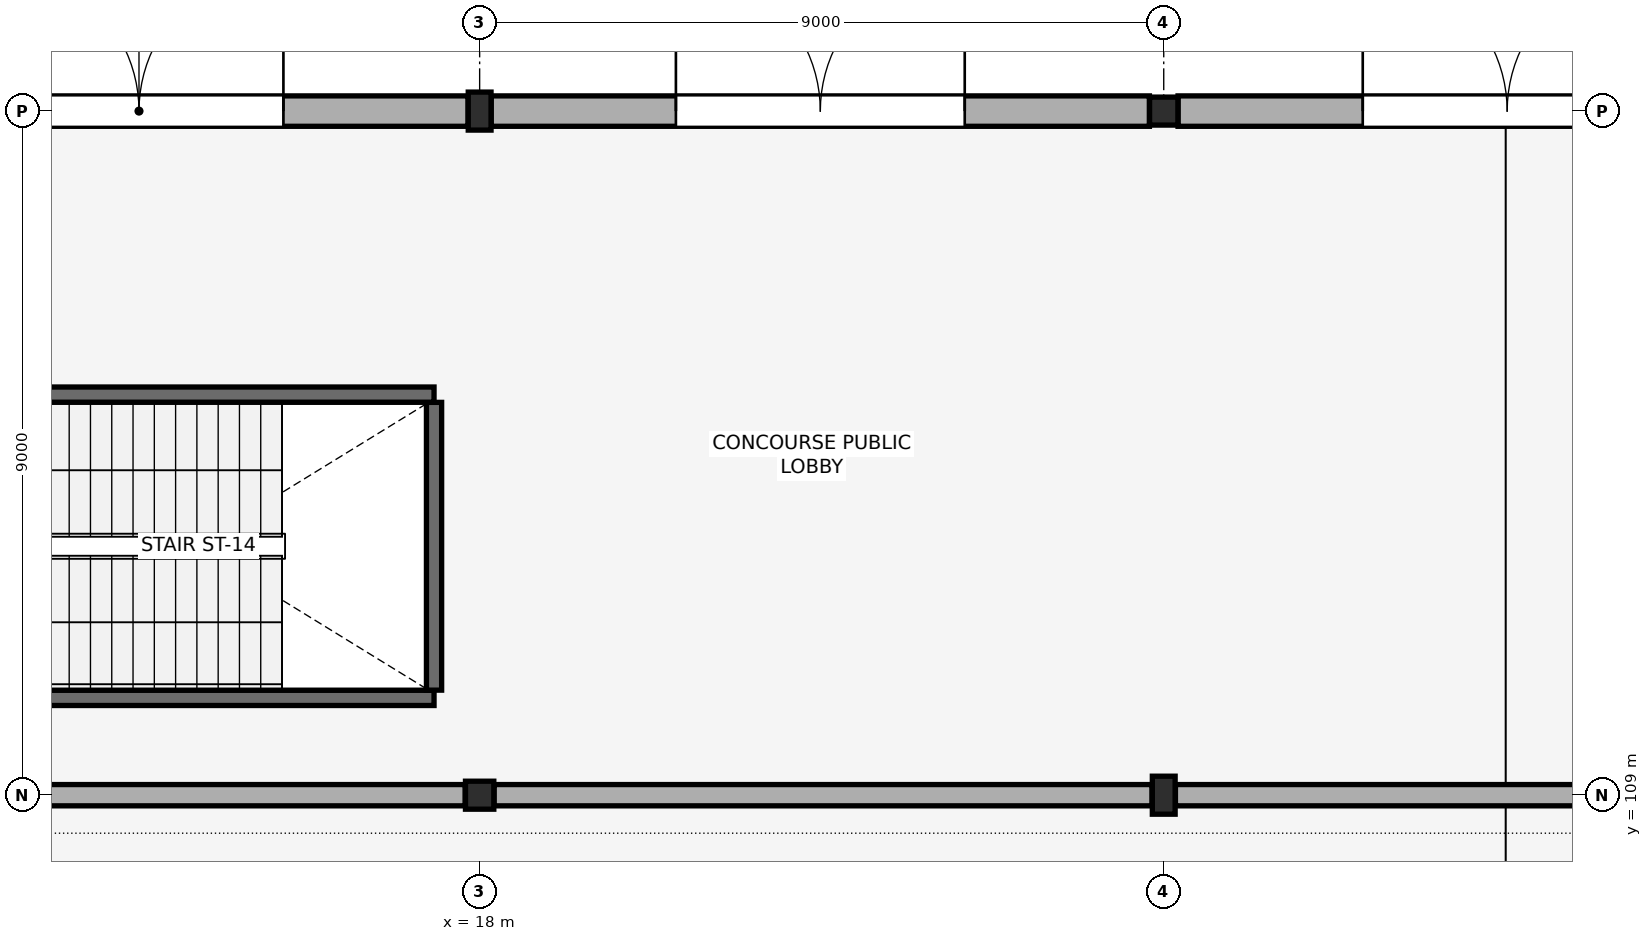
"""IFC4 building model, lengths in metres.
Left out: names, types, materials, properties, quantities, classifications, styles, units other than length and angle.
Written with IfcOpenShell. Run it as: python <this file> out.ifc"""

import sys

from ifc_helpers import new_model, si_unit, direction, frame, frame_2d, origin, origin_2d, place, context, subcontext, project, spatial, rectangle, i_section, extrude, element, fill, save


model = new_model("IFC4")
c1 = context("Model", 3, precision=1e-05, world=origin(), true_north=direction((0.0, 1.0)))
c2 = subcontext(c1, "Body", "Model", "MODEL_VIEW")
j1 = project(units=[si_unit("LENGTHUNIT", "METRE"), si_unit("PLANEANGLEUNIT", "RADIAN")], contexts=[c1])
p1 = place(None, origin())
s1 = spatial("IfcSite", under=j1, at=p1, CompositionType="ELEMENT")
p2 = place(p1, origin())
s2 = spatial("IfcBuilding", under=s1, at=p2, CompositionType="ELEMENT")
p3 = place(p2, origin())
s3 = spatial("IfcBuildingStorey", under=s2, at=p3, CompositionType="ELEMENT", Elevation=0.0)
p4 = place(p3, frame((18.0, 109.0, 0.0), z_axis=(0.0, 0.0, 1.0), x_axis=(1.0, 0.0, 0.0)))
e1 = element("IfcColumn", 1, at=p4, inside=s3, PredefinedType="COLUMN", context=c2, shape_type="SweptSolid", body=[
    extrude(i_section(OverallWidth=0.373, OverallDepth=0.368, WebThickness=0.014, FlangeThickness=0.024, FilletRadius=0.015, at=origin_2d()), origin(), (0.0, 0.0, 1.0), 5.4),
])
for number, where, z_axis, x_axis in (
    (2, (18.0, 118.0, 0.0), (0.0, 0.0, 1.0), (1.0, 0.0, 0.0)),
    (3, (27.0, 109.0, 0.0), (0.0, 0.0, 1.0), (1.0, 0.0, 0.0)),
):
    element("IfcColumn", number, at=place(p3, frame(where, z_axis=z_axis, x_axis=x_axis)), inside=s3, PredefinedType="COLUMN", context=c2, shape_type="SweptSolid", body=[
        extrude(i_section(OverallWidth=0.3, OverallDepth=0.5, WebThickness=0.014, FlangeThickness=0.028, FilletRadius=0.027, at=origin_2d()), origin(), (0.0, 0.0, 1.0), 5.4),
    ])
p5 = place(p3, frame((27.0, 118.0, 0.0), z_axis=(0.0, 0.0, 1.0), x_axis=(1.0, 0.0, 0.0)))
e4 = element("IfcColumn", 4, at=p5, inside=s3, PredefinedType="COLUMN", context=c2, shape_type="SweptSolid", body=[
    extrude(i_section(OverallWidth=0.373, OverallDepth=0.368, WebThickness=0.014, FlangeThickness=0.024, FilletRadius=0.015, at=origin_2d()), origin(), (0.0, 0.0, 1.0), 5.4),
])
p6 = place(p3, frame((9.188, 118.0, 0.0), z_axis=(0.0, 0.0, 1.0), x_axis=(1.0, 0.0, 0.0)))
e5 = element("IfcWall", 5, at=p6, inside=s3, PredefinedType="STANDARD", context=c2, shape_type="SweptSolid", body=[
    extrude(rectangle(XDim=8.66, YDim=0.4, at=frame_2d((4.33, 0.0))), origin(), (0.0, 0.0, 1.0), 4.507),
])
p7 = place(p6, frame((2.43, 0.0, 0.0)))
e6 = element("IfcOpeningElement", 6, at=p7, cuts=e5, PredefinedType="OPENING", context=c2, shape_type="SweptSolid", body=[
    extrude(rectangle(XDim=3.8, YDim=2.8, at=frame_2d((1.9, 1.4))), frame((0.0, 0.21, 0.0), z_axis=(0.0, -1.0, 0.0), x_axis=(1.0, 0.0, 0.0)), (0.0, 0.0, 1.0), 0.42),
])
p8 = place(p3, frame((18.152, 118.0, 0.0), z_axis=(0.0, 0.0, 1.0), x_axis=(1.0, 0.0, 0.0)))
e7 = element("IfcWall", 7, at=p8, inside=s3, PredefinedType="STANDARD", context=c2, shape_type="SweptSolid", body=[
    extrude(rectangle(XDim=8.66, YDim=0.4, at=frame_2d((4.33, 0.0))), origin(), (0.0, 0.0, 1.0), 4.507),
])
p9 = place(p8, frame((2.43, 0.0, 0.0)))
e8 = element("IfcOpeningElement", 8, at=p9, cuts=e7, PredefinedType="OPENING", context=c2, shape_type="SweptSolid", body=[
    extrude(rectangle(XDim=3.8, YDim=2.8, at=frame_2d((1.9, 1.4))), frame((0.0, 0.21, 0.0), z_axis=(0.0, -1.0, 0.0), x_axis=(1.0, 0.0, 0.0)), (0.0, 0.0, 1.0), 0.42),
])
p10 = place(p3, frame((27.188, 118.0, 0.0), z_axis=(0.0, 0.0, 1.0), x_axis=(1.0, 0.0, 0.0)))
e9 = element("IfcWall", 9, at=p10, inside=s3, PredefinedType="STANDARD", context=c2, shape_type="SweptSolid", body=[
    extrude(rectangle(XDim=8.66, YDim=0.4, at=frame_2d((4.33, 0.0))), origin(), (0.0, 0.0, 1.0), 4.507),
])
p11 = place(p10, frame((2.43, 0.0, 0.0)))
e10 = element("IfcOpeningElement", 10, at=p11, cuts=e9, PredefinedType="OPENING", context=c2, shape_type="SweptSolid", body=[
    extrude(rectangle(XDim=3.8, YDim=2.8, at=frame_2d((1.9, 1.4))), frame((0.0, 0.21, 0.0), z_axis=(0.0, -1.0, 0.0), x_axis=(1.0, 0.0, 0.0)), (0.0, 0.0, 1.0), 0.42),
])
p12 = place(p3, frame((9.45, 110.28, 0.0), z_axis=(0.0, 0.0, 1.0), x_axis=(1.0, 0.0, 0.0)))
e11 = element("IfcWall", 11, at=p12, inside=s3, PredefinedType="SHEAR", context=c2, shape_type="SweptSolid", body=[
    extrude(rectangle(XDim=7.95, YDim=0.2, at=frame_2d((3.975, 0.0))), origin(), (0.0, 0.0, 1.0), 5.4),
])
p13 = place(p3, frame((17.4, 110.382, 0.0), z_axis=(0.0, 0.0, 1.0), x_axis=(0.0, 1.0, 0.0)))
e12 = element("IfcWall", 12, at=p13, inside=s3, PredefinedType="SHEAR", context=c2, shape_type="SweptSolid", body=[
    extrude(rectangle(XDim=3.786, YDim=0.2, at=frame_2d((1.893, 0.0))), origin(), (0.0, 0.0, 1.0), 5.4),
])
p14 = place(p3, frame((9.45, 114.27, 0.0), z_axis=(0.0, 0.0, 1.0), x_axis=(1.0, 0.0, 0.0)))
e13 = element("IfcWall", 13, at=p14, inside=s3, PredefinedType="SHEAR", context=c2, shape_type="SweptSolid", body=[
    extrude(rectangle(XDim=7.95, YDim=0.2, at=frame_2d((3.975, 0.0))), origin(), (0.0, 0.0, 1.0), 5.4),
])
for number, where, z_axis, x_axis in (
    (14, (9.154, 109.0, 0.0), (0.0, 0.0, 1.0), (1.0, 0.0, 0.0)),
    (15, (18.19, 109.0, 0.0), (0.0, 0.0, 1.0), (1.0, 0.0, 0.0)),
):
    element("IfcWall", number, at=place(p3, frame(where, z_axis=z_axis, x_axis=x_axis)), inside=s3, PredefinedType="PARTITIONING", context=c2, shape_type="SweptSolid", body=[
        extrude(rectangle(XDim=8.656, YDim=0.28, at=frame_2d((4.328, 0.0))), origin(), (0.0, 0.0, 1.0), 4.507),
    ])
p15 = place(p3, frame((27.154, 109.0, 0.0), z_axis=(0.0, 0.0, 1.0), x_axis=(1.0, 0.0, 0.0)))
e16 = element("IfcWall", 16, at=p15, inside=s3, PredefinedType="PARTITIONING", context=c2, shape_type="SweptSolid", body=[
    extrude(rectangle(XDim=7.346, YDim=0.28, at=frame_2d((3.673, 0.0))), origin(), (0.0, 0.0, 1.0), 4.507),
])
p16 = place(p7, origin())
e17 = element("IfcDoor", 17, at=p16, inside=s3, OperationType="DOUBLE_DOOR_SINGLE_SWING", PredefinedType="DOOR", context=c2, shape_type="SweptSolid", body=[
    extrude(rectangle(XDim=3.8, YDim=2.8, at=frame_2d((1.9, 1.4))), frame((0.0, 0.025, 0.0), z_axis=(0.0, -1.0, 0.0), x_axis=(1.0, 0.0, 0.0)), (0.0, 0.0, 1.0), 0.05),
])
fill(e6, e17)
p17 = place(p9, origin())
e18 = element("IfcDoor", 18, at=p17, inside=s3, OperationType="DOUBLE_DOOR_SINGLE_SWING", PredefinedType="DOOR", context=c2, shape_type="SweptSolid", body=[
    extrude(rectangle(XDim=3.8, YDim=2.8, at=frame_2d((1.9, 1.4))), frame((0.0, 0.025, 0.0), z_axis=(0.0, -1.0, 0.0), x_axis=(1.0, 0.0, 0.0)), (0.0, 0.0, 1.0), 0.05),
])
fill(e8, e18)
p18 = place(p11, origin())
e19 = element("IfcDoor", 19, at=p18, inside=s3, OperationType="DOUBLE_DOOR_SINGLE_SWING", PredefinedType="DOOR", context=c2, shape_type="SweptSolid", body=[
    extrude(rectangle(XDim=3.8, YDim=2.8, at=frame_2d((1.9, 1.4))), frame((0.0, 0.025, 0.0), z_axis=(0.0, -1.0, 0.0), x_axis=(1.0, 0.0, 0.0)), (0.0, 0.0, 1.0), 0.05),
])
fill(e10, e19)
save(model, sys.argv[1])
